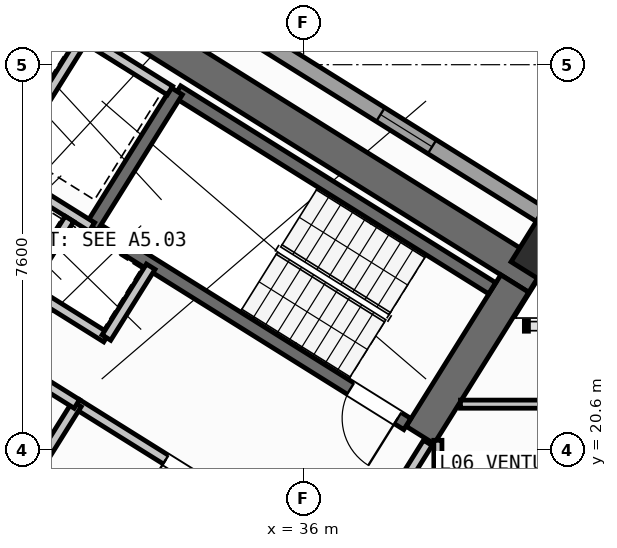
"""IFC4 building model, lengths in metres.
Left out: names, types, materials, properties, quantities, classifications, styles, units other than length and angle.
Written with IfcOpenShell. Run it as: python <this file> out.ifc"""

import sys

from ifc_helpers import new_model, si_unit, direction, frame, frame_2d, origin, origin_2d, place, context, subcontext, project, spatial, rectangle, hollow_rectangle, extrude, source, transform, mapped, element, fill, save


model = new_model("IFC4")
c1 = context("Model", 3, precision=1e-05, world=origin(), true_north=direction((0.0, 1.0)))
c2 = subcontext(c1, "Body", "Model", "MODEL_VIEW")
j1 = project(units=[si_unit("LENGTHUNIT", "METRE"), si_unit("PLANEANGLEUNIT", "RADIAN")], contexts=[c1])
p1 = place(None, origin())
s1 = spatial("IfcSite", under=j1, at=p1, CompositionType="ELEMENT")
p2 = place(p1, origin())
s2 = spatial("IfcBuilding", under=s1, at=p2, CompositionType="ELEMENT")
p3 = place(p2, frame((0.0, 0.0, 27.6)))
s3 = spatial("IfcBuildingStorey", under=s2, at=p3, CompositionType="ELEMENT", Elevation=27.6)
p4 = place(p3, frame((40.615, 23.983, 0.0), z_axis=(0.0, 0.0, 1.0), x_axis=(-0.848045953968, 0.529922692436, 0.0)))
e1 = element("IfcWall", 1, at=p4, inside=s3, PredefinedType="SHEAR", context=c2, shape_type="SweptSolid", body=[
    extrude(rectangle(XDim=13.24, YDim=0.65, at=frame_2d((6.62, 0.0))), origin(), (0.0, 0.0, 1.0), 3.35),
])
p5 = place(p3, frame((40.168, 23.88, 0.0), z_axis=(0.0, 0.0, 1.0), x_axis=(-0.529893103397, -0.8480644427, 0.0)))
e2 = element("IfcWall", 2, at=p5, inside=s3, PredefinedType="SHEAR", context=c2, shape_type="SweptSolid", body=[
    extrude(rectangle(XDim=3.525, YDim=0.65, at=frame_2d((1.763, 0.0))), origin(), (0.0, 0.0, 1.0), 3.35),
])
m1 = source(origin(), c2, "Body", "SweptSolid", [
    extrude(hollow_rectangle(XDim=1.0, YDim=1.0, WallThickness=0.04, at=origin_2d()), origin(), (0.0, 0.0, 1.0), 3.6),
])
p6 = place(p3, frame((40.783, 24.469, 0.0), z_axis=(0.0, 0.0, 1.0), x_axis=(-0.848048096156, 0.529919264233, 0.0)))
e3 = element("IfcColumn", 3, at=p6, inside=s3, PredefinedType="COLUMN", context=c2, shape_type="MappedRepresentation", body=[
    mapped(m1, transform((0.0, 0.0, 0.0), scale=1.0)),
])
p7 = place(p3, frame((14.138, 41.825, 0.0), z_axis=(0.0, 0.0, 1.0), x_axis=(0.848046498049, -0.529921821731, 0.0)))
e4 = element("IfcWall", 4, at=p7, inside=s3, PredefinedType="STANDARD", context=c2, shape_type="SweptSolid", body=[
    extrude(rectangle(XDim=31.588, YDim=0.32, at=frame_2d((15.794, 0.0))), origin(), (0.0, 0.0, 1.0), 3.35),
])
p8 = place(p7, frame((3.369, 0.0, 0.0)))
e5 = element("IfcOpeningElement", 5, at=p8, cuts=e4, PredefinedType="OPENING", context=c2, shape_type="SweptSolid", body=[
    extrude(rectangle(XDim=1.05, YDim=2.15, at=frame_2d((0.525, 1.075))), frame((0.0, 0.17, 0.0), z_axis=(0.0, -1.0, 0.0), x_axis=(1.0, 0.0, 0.0)), (0.0, 0.0, 1.0), 0.34),
])
p9 = place(p7, frame((0.946, 0.0, 0.85)))
e6 = element("IfcOpeningElement", 6, at=p9, cuts=e4, PredefinedType="OPENING", context=c2, shape_type="SweptSolid", body=[
    extrude(rectangle(XDim=1.8, YDim=1.5, at=frame_2d((0.9, 0.75))), frame((0.0, 0.17, 0.0), z_axis=(0.0, -1.0, 0.0), x_axis=(1.0, 0.0, 0.0)), (0.0, 0.0, 1.0), 0.34),
])
p10 = place(p7, frame((8.46, 0.0, 0.85)))
e7 = element("IfcOpeningElement", 7, at=p10, cuts=e4, PredefinedType="OPENING", context=c2, shape_type="SweptSolid", body=[
    extrude(rectangle(XDim=1.8, YDim=1.5, at=frame_2d((0.9, 0.75))), frame((0.0, 0.17, 0.0), z_axis=(0.0, -1.0, 0.0), x_axis=(1.0, 0.0, 0.0)), (0.0, 0.0, 1.0), 0.34),
])
p11 = place(p7, frame((13.899, 0.0, 0.85)))
e8 = element("IfcOpeningElement", 8, at=p11, cuts=e4, PredefinedType="OPENING", context=c2, shape_type="SweptSolid", body=[
    extrude(rectangle(XDim=1.5, YDim=1.5, at=frame_2d((0.75, 0.75))), frame((0.0, 0.17, 0.0), z_axis=(0.0, -1.0, 0.0), x_axis=(1.0, 0.0, 0.0)), (0.0, 0.0, 1.0), 0.34),
])
p12 = place(p7, frame((22.019, 0.0, 0.95)))
e9 = element("IfcOpeningElement", 9, at=p12, cuts=e4, PredefinedType="OPENING", context=c2, shape_type="SweptSolid", body=[
    extrude(rectangle(XDim=1.2, YDim=1.4, at=frame_2d((0.6, 0.7))), frame((0.0, 0.17, 0.0), z_axis=(0.0, -1.0, 0.0), x_axis=(1.0, 0.0, 0.0)), (0.0, 0.0, 1.0), 0.34),
])
p13 = place(p7, frame((27.569, 0.0, 0.95)))
e10 = element("IfcOpeningElement", 10, at=p13, cuts=e4, PredefinedType="OPENING", context=c2, shape_type="SweptSolid", body=[
    extrude(rectangle(XDim=1.2, YDim=1.4, at=frame_2d((0.6, 0.7))), frame((0.0, 0.17, 0.0), z_axis=(0.0, -1.0, 0.0), x_axis=(1.0, 0.0, 0.0)), (0.0, 0.0, 1.0), 0.34),
])
p14 = place(p3, frame((31.28, 18.261, 0.0), z_axis=(0.0, 0.0, 1.0), x_axis=(-0.848051618787, 0.529913626805, 0.0)))
e11 = element("IfcWall", 11, at=p14, inside=s3, PredefinedType="SHEAR", context=c2, shape_type="SweptSolid", body=[
    extrude(rectangle(XDim=7.46, YDim=0.26, at=frame_2d((3.73, 0.0))), origin(), (0.0, 0.0, 1.0), 3.35),
])
p15 = place(p14, frame((0.36, 0.0, 0.0)))
e12 = element("IfcOpeningElement", 12, at=p15, cuts=e11, PredefinedType="OPENING", context=c2, shape_type="SweptSolid", body=[
    extrude(rectangle(XDim=0.86, YDim=2.05, at=frame_2d((0.43, 1.025))), frame((0.0, 0.14, 0.0), z_axis=(0.0, -1.0, 0.0), x_axis=(1.0, 0.0, 0.0)), (0.0, 0.0, 1.0), 0.28),
])
p16 = place(p3, frame((39.721, 23.788, 0.0), z_axis=(0.0, 0.0, 1.0), x_axis=(-0.848054434086, 0.529909121291, 0.0)))
e13 = element("IfcWall", 13, at=p16, inside=s3, PredefinedType="SHEAR", context=c2, shape_type="SweptSolid", body=[
    extrude(rectangle(XDim=7.33, YDim=0.26, at=frame_2d((3.665, 0.0))), origin(), (0.0, 0.0, 1.0), 3.35),
])
p17 = place(p3, frame((38.046, 21.108, 0.0), z_axis=(0.0, 0.0, 1.0), x_axis=(-0.848054434086, 0.529909121291, 0.0)))
e14 = element("IfcWall", 14, at=p17, inside=s3, PredefinedType="SHEAR", context=c2, shape_type="SweptSolid", body=[
    extrude(rectangle(XDim=7.33, YDim=0.26, at=frame_2d((3.665, 0.0))), origin(), (0.0, 0.0, 1.0), 3.35),
])
p18 = place(p17, frame((0.22, 0.0, 0.0)))
e15 = element("IfcOpeningElement", 15, at=p18, cuts=e14, PredefinedType="OPENING", context=c2, shape_type="SweptSolid", body=[
    extrude(rectangle(XDim=1.1, YDim=2.1, at=frame_2d((0.55, 1.05))), frame((0.0, 0.14, 0.0), z_axis=(0.0, -1.0, 0.0), x_axis=(1.0, 0.0, 0.0)), (0.0, 0.0, 1.0), 0.28),
])
p19 = place(p3, frame((33.496, 27.677, 0.0), z_axis=(0.0, 0.0, 1.0), x_axis=(-0.529908658664, -0.84805472316, 0.0)))
e16 = element("IfcWall", 16, at=p19, inside=s3, PredefinedType="SHEAR", context=c2, shape_type="SweptSolid", body=[
    extrude(rectangle(XDim=3.16, YDim=0.26, at=frame_2d((1.58, 0.0))), origin(), (0.0, 0.0, 1.0), 3.35),
])
p20 = place(p3, frame((36.374, 18.474, 0.0), z_axis=(0.0, 0.0, 1.0), x_axis=(-0.848051071577, 0.529914502535, 0.0)))
e17 = element("IfcWall", 17, at=p20, inside=s3, PredefinedType="STANDARD", context=c2, shape_type="SweptSolid", body=[
    extrude(rectangle(XDim=5.718, YDim=0.2, at=frame_2d((2.859, 0.0))), origin(), (0.0, 0.0, 1.0), 3.34),
])
p21 = place(p20, frame((2.498, 0.0, 0.0)))
e18 = element("IfcOpeningElement", 18, at=p21, cuts=e17, PredefinedType="OPENING", context=c2, shape_type="SweptSolid", body=[
    extrude(rectangle(XDim=1.15, YDim=2.1, at=frame_2d((0.575, 1.05))), frame((0.0, 0.11, 0.0), z_axis=(0.0, -1.0, 0.0), x_axis=(1.0, 0.0, 0.0)), (0.0, 0.0, 1.0), 0.22),
])
p22 = place(p3, frame((31.822, 24.998, 0.0), z_axis=(0.0, 0.0, 1.0), x_axis=(-0.848058348634, 0.529902856485, 0.0)))
e19 = element("IfcWall", 19, at=p22, inside=s3, PredefinedType="STANDARD", context=c2, shape_type="SweptSolid", body=[
    extrude(rectangle(XDim=4.568, YDim=0.2, at=frame_2d((2.284, 0.0))), origin(), (0.0, 0.0, 1.0), 3.34),
])
p23 = place(p3, frame((32.108, 22.814, 0.0), z_axis=(0.0, 0.0, 1.0), x_axis=(-0.848042229521, 0.529928652696, 0.0)))
e20 = element("IfcWall", 20, at=p23, inside=s3, PredefinedType="STANDARD", context=c2, shape_type="SweptSolid", body=[
    extrude(rectangle(XDim=5.62, YDim=0.2, at=frame_2d((2.81, 0.0))), origin(), (0.0, 0.0, 1.0), 3.34),
])
p24 = place(p3, frame((32.982, 24.213, 0.0), z_axis=(0.0, 0.0, 1.0), x_axis=(-0.529839334948, -0.84809803628, 0.0)))
e21 = element("IfcWall", 21, at=p24, inside=s3, PredefinedType="STANDARD", context=c2, shape_type="SweptSolid", body=[
    extrude(rectangle(XDim=1.65, YDim=0.2, at=frame_2d((0.825, 0.0))), origin(), (0.0, 0.0, 1.0), 3.34),
])
p25 = place(p3, frame((31.645, 28.716, 0.0), z_axis=(0.0, 0.0, 1.0), x_axis=(-0.52986693015, -0.848080795876, 0.0)))
e22 = element("IfcWall", 22, at=p25, inside=s3, PredefinedType="STANDARD", context=c2, shape_type="SweptSolid", body=[
    extrude(rectangle(XDim=2.66, YDim=0.2, at=frame_2d((1.33, 0.0))), origin(), (0.0, 0.0, 1.0), 3.34),
])
p26 = place(p3, frame((33.363, 27.69, 0.0), z_axis=(0.0, 0.0, 1.0), x_axis=(-0.848053806312, 0.529910125964, 0.0)))
e23 = element("IfcWall", 23, at=p26, inside=s3, PredefinedType="STANDARD", context=c2, shape_type="SweptSolid", body=[
    extrude(rectangle(XDim=4.448, YDim=0.2, at=frame_2d((2.224, 0.0))), origin(), (0.0, 0.0, 1.0), 3.34),
])
p27 = place(p3, frame((31.379, 25.156, 0.0), z_axis=(0.0, 0.0, 1.0), x_axis=(-0.529998940003, -0.847998304005, 0.0)))
e24 = element("IfcWall", 24, at=p27, inside=s3, PredefinedType="STANDARD", context=c2, shape_type="SweptSolid", body=[
    extrude(rectangle(XDim=1.58, YDim=0.2, at=frame_2d((0.79, 0.0))), origin(), (0.0, 0.0, 1.0), 3.34),
])
p28 = place(p3, frame((31.525, 21.504, 0.0), z_axis=(0.0, 0.0, 1.0), x_axis=(-0.529907497854, -0.848055448493, 0.0)))
e25 = element("IfcWall", 25, at=p28, inside=s3, PredefinedType="STANDARD", context=c2, shape_type="SweptSolid", body=[
    extrude(rectangle(XDim=2.88, YDim=0.2, at=frame_2d((1.44, 0.0))), origin(), (0.0, 0.0, 1.0), 3.34),
])
p29 = place(p3, frame((31.525, 21.504, 0.0), z_axis=(0.0, 0.0, 1.0), x_axis=(-0.848044998614, 0.529924221305, 0.0)))
e26 = element("IfcWall", 26, at=p29, inside=s3, PredefinedType="STANDARD", context=c2, shape_type="SweptSolid", body=[
    extrude(rectangle(XDim=6.168, YDim=0.2, at=frame_2d((3.084, 0.0))), origin(), (0.0, 0.0, 1.0), 3.34),
])
p30 = place(p29, frame((4.4, 0.0, 0.0)))
e27 = element("IfcOpeningElement", 27, at=p30, cuts=e26, PredefinedType="OPENING", context=c2, shape_type="SweptSolid", body=[
    extrude(rectangle(XDim=0.86, YDim=2.05, at=frame_2d((0.43, 1.025))), frame((0.0, 0.11, 0.0), z_axis=(0.0, -1.0, 0.0), x_axis=(1.0, 0.0, 0.0)), (0.0, 0.0, 1.0), 0.22),
])
p31 = place(p29, frame((1.45, 0.0, 0.0)))
e28 = element("IfcOpeningElement", 28, at=p31, cuts=e26, PredefinedType="OPENING", context=c2, shape_type="SweptSolid", body=[
    extrude(rectangle(XDim=0.86, YDim=2.05, at=frame_2d((0.43, 1.025))), frame((0.0, 0.11, 0.0), z_axis=(0.0, -1.0, 0.0), x_axis=(1.0, 0.0, 0.0)), (0.0, 0.0, 1.0), 0.22),
])
p32 = place(p3, frame((38.451, 20.737, 0.0), z_axis=(0.0, 0.0, 1.0), x_axis=(-0.529924799939, -0.848044637038, 0.0)))
e29 = element("IfcWall", 29, at=p32, inside=s3, PredefinedType="STANDARD", context=c2, shape_type="SweptSolid", body=[
    extrude(rectangle(XDim=2.96, YDim=0.2, at=frame_2d((1.48, 0.0))), origin(), (0.0, 0.0, 1.0), 3.34),
])
p33 = place(p32, frame((1.46, 0.0, 0.0)))
e30 = element("IfcOpeningElement", 30, at=p33, cuts=e29, PredefinedType="OPENING", context=c2, shape_type="SweptSolid", body=[
    extrude(rectangle(XDim=0.86, YDim=2.05, at=frame_2d((0.43, 1.025))), frame((0.0, 0.11, 0.0), z_axis=(0.0, -1.0, 0.0), x_axis=(1.0, 0.0, 0.0)), (0.0, 0.0, 1.0), 0.22),
])
p34 = place(p3, frame((38.65, 17.93, 0.0), z_axis=(0.0, 0.0, 1.0), x_axis=(0.0, 1.0, 0.0)))
e31 = element("IfcWall", 31, at=p34, inside=s3, PredefinedType="PARTITIONING", context=c2, shape_type="SweptSolid", body=[
    extrude(rectangle(XDim=2.857, YDim=0.16, at=frame_2d((1.428, 0.0))), origin(), (0.0, 0.0, 1.0), 3.34),
])
p35 = place(p3, frame((39.095, 21.5, 0.0), z_axis=(0.0, 0.0, 1.0), x_axis=(1.0, 0.0, 0.0)))
e32 = element("IfcWall", 32, at=p35, inside=s3, PredefinedType="PARTITIONING", context=c2, shape_type="SweptSolid", body=[
    extrude(rectangle(XDim=7.094, YDim=0.16, at=frame_2d((3.547, 0.0))), origin(), (0.0, 0.0, 1.0), 3.34),
])
m2 = source(origin(), c2, "Body", "SweptSolid", [
    extrude(rectangle(XDim=1.2, YDim=1.4, at=frame_2d((0.6, 0.7))), frame((0.0, 0.03, 0.0), z_axis=(0.0, -1.0, 0.0), x_axis=(1.0, 0.0, 0.0)), (0.0, 0.0, 1.0), 0.06),
])
p36 = place(p13, origin())
e33 = element("IfcWindow", 33, at=p36, inside=s3, PartitioningType="SINGLE_PANEL", PredefinedType="WINDOW", context=c2, shape_type="MappedRepresentation", body=[
    mapped(m2, transform((0.0, 0.0, 0.0), scale=1.0)),
])
fill(e10, e33)
m3 = source(origin(), c2, "Body", "SweptSolid", [
    extrude(rectangle(XDim=1.1, YDim=2.1, at=frame_2d((0.55, 1.05))), frame((0.0, 0.025, 0.0), z_axis=(0.0, -1.0, 0.0), x_axis=(1.0, 0.0, 0.0)), (0.0, 0.0, 1.0), 0.05),
])
p37 = place(p18, origin())
e34 = element("IfcDoor", 34, at=p37, inside=s3, OperationType="SINGLE_SWING_LEFT", PredefinedType="DOOR", context=c2, shape_type="MappedRepresentation", body=[
    mapped(m3, transform((0.0, 0.0, 0.0), scale=1.0)),
])
fill(e15, e34)
m4 = source(origin(), c2, "Body", "SweptSolid", [
    extrude(rectangle(XDim=1.15, YDim=2.1, at=frame_2d((0.575, 1.05))), frame((0.0, 0.025, 0.0), z_axis=(0.0, -1.0, 0.0), x_axis=(1.0, 0.0, 0.0)), (0.0, 0.0, 1.0), 0.05),
])
p38 = place(p21, origin())
e35 = element("IfcDoor", 35, at=p38, inside=s3, OperationType="SINGLE_SWING_RIGHT", PredefinedType="DOOR", context=c2, shape_type="MappedRepresentation", body=[
    mapped(m4, transform((0.0, 0.0, 0.0), scale=1.0)),
])
fill(e18, e35)
save(model, sys.argv[1])
